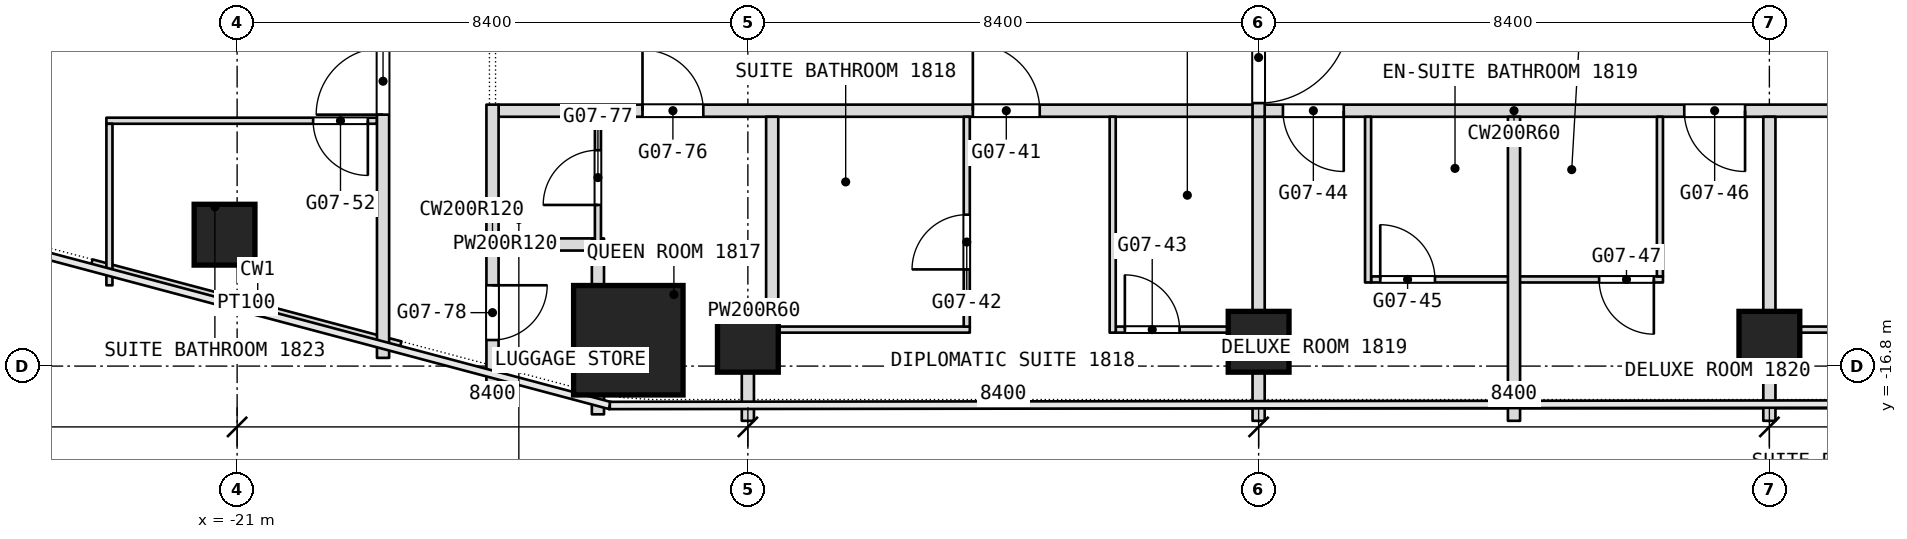
"""IFC4 building model, lengths in metres.
Left out: names, types, materials, properties, quantities, classifications, styles, units other than length and angle.
Written with IfcOpenShell. Run it as: python <this file> out.ifc"""

import sys

from ifc_helpers import new_model, si_unit, direction, frame, frame_2d, origin, origin_2d, place, context, subcontext, project, spatial, rectangle, extrude, element, fill, save


model = new_model("IFC4")
c1 = context("Model", 3, precision=1e-05, world=origin(), true_north=direction((0.0, 1.0)))
c2 = subcontext(c1, "Body", "Model", "MODEL_VIEW")
j1 = project(units=[si_unit("LENGTHUNIT", "METRE"), si_unit("PLANEANGLEUNIT", "RADIAN")], contexts=[c1])
p1 = place(None, origin())
s1 = spatial("IfcSite", under=j1, at=p1, CompositionType="ELEMENT")
p2 = place(p1, origin())
s2 = spatial("IfcBuilding", under=s1, at=p2, CompositionType="ELEMENT")
p3 = place(p2, frame((0.0, 0.0, 79.7)))
s3 = spatial("IfcBuildingStorey", under=s2, at=p3, CompositionType="ELEMENT", Elevation=79.7)
p4 = place(p3, frame((-14.566, -16.375, 0.0), z_axis=(0.0, 0.0, 1.0), x_axis=(1.0, 0.0, 0.0)))
e1 = element("IfcColumn", 1, at=p4, inside=s3, PredefinedType="COLUMN", context=c2, shape_type="SweptSolid", body=[
    extrude(rectangle(XDim=1.8, YDim=1.8, at=origin_2d()), origin(), (0.0, 0.0, 1.0), 3.6),
])
for number, where, z_axis, x_axis in (
    (2, (4.2, -16.4, 0.0), (0.0, 0.0, 1.0), (1.0, 0.0, 0.0)),
    (3, (-4.2, -16.4, 0.0), (0.0, 0.0, 1.0), (1.0, 0.0, 0.0)),
    (4, (-12.6, -16.4, 0.0), (0.0, 0.0, 1.0), (1.0, 0.0, 0.0)),
    (5, (-21.207, -14.639, 0.0), (0.0, 0.0, 1.0), (1.0, 0.0, 0.0)),
):
    element("IfcColumn", number, at=place(p3, frame(where, z_axis=z_axis, x_axis=x_axis)), inside=s3, PredefinedType="COLUMN", context=c2, shape_type="SweptSolid", body=[
        extrude(rectangle(XDim=1.0, YDim=1.0, at=origin_2d()), origin(), (0.0, 0.0, 1.0), 3.6),
    ])
p5 = place(p3, frame((-23.39, -15.094, 0.0), z_axis=(0.0, 0.0, 1.0), x_axis=(0.966552628131, -0.256468354876, 0.0)))
e6 = element("IfcWall", 6, at=p5, inside=s3, PredefinedType="PARTITIONING", context=c2, shape_type="SweptSolid", body=[
    extrude(rectangle(XDim=5.256, YDim=0.1, at=frame_2d((2.628, 0.0))), origin(), (0.0, 0.0, 1.0), 3.34),
])
p6 = place(p3, frame((-12.5, -16.2, 0.0), z_axis=(0.0, 0.0, 1.0), x_axis=(1.0, 0.0, 0.0)))
e7 = element("IfcWall", 7, at=p6, inside=s3, PredefinedType="PARTITIONING", context=c2, shape_type="SweptSolid", body=[
    extrude(rectangle(XDim=3.55, YDim=0.1, at=frame_2d((1.775, 0.0))), origin(), (0.0, 0.0, 1.0), 2.94),
])
p7 = place(p3, frame((-6.55, -16.2, 0.0), z_axis=(0.0, 0.0, 1.0), x_axis=(1.0, 0.0, 0.0)))
e8 = element("IfcWall", 8, at=p7, inside=s3, PredefinedType="PARTITIONING", context=c2, shape_type="SweptSolid", body=[
    extrude(rectangle(XDim=2.45, YDim=0.1, at=frame_2d((1.225, 0.0))), origin(), (0.0, 0.0, 1.0), 2.94),
])
p8 = place(p7, frame((0.15, 0.0, 0.0)))
e9 = element("IfcOpeningElement", 9, at=p8, cuts=e8, PredefinedType="OPENING", context=c2, shape_type="SweptSolid", body=[
    extrude(rectangle(XDim=0.9, YDim=2.1, at=frame_2d((0.45, 1.05))), frame((0.0, 0.05, 0.0), z_axis=(0.0, -1.0, 0.0), x_axis=(1.0, 0.0, 0.0)), (0.0, 0.0, 1.0), 0.1),
])
p9 = place(p3, frame((4.3, -16.2, 0.0), z_axis=(0.0, 0.0, 1.0), x_axis=(1.0, 0.0, 0.0)))
e10 = element("IfcWall", 10, at=p9, inside=s3, PredefinedType="PARTITIONING", context=c2, shape_type="SweptSolid", body=[
    extrude(rectangle(XDim=3.55, YDim=0.1, at=frame_2d((1.775, 0.0))), origin(), (0.0, 0.0, 1.0), 2.94),
])
p10 = place(p9, frame((2.5, 0.0, 0.0)))
e11 = element("IfcOpeningElement", 11, at=p10, cuts=e10, PredefinedType="OPENING", context=c2, shape_type="SweptSolid", body=[
    extrude(rectangle(XDim=0.9, YDim=2.1, at=frame_2d((0.45, 1.05))), frame((0.0, 0.05, 0.0), z_axis=(0.0, -1.0, 0.0), x_axis=(1.0, 0.0, 0.0)), (0.0, 0.0, 1.0), 0.1),
])
p11 = place(p3, frame((-12.7, -15.9, 0.0), z_axis=(0.0, 0.0, 1.0), x_axis=(1.0, 0.0, 0.0)))
e12 = element("IfcWall", 12, at=p11, inside=s3, PredefinedType="PARTITIONING", context=c2, shape_type="SweptSolid", body=[
    extrude(rectangle(XDim=0.4, YDim=0.2, at=frame_2d((0.2, 0.0))), origin(), (0.0, 0.0, 1.0), 3.34),
])
p12 = place(p3, frame((-2.35, -15.375, 0.0), z_axis=(0.0, 0.0, 1.0), x_axis=(1.0, 0.0, 0.0)))
e13 = element("IfcWall", 13, at=p12, inside=s3, PredefinedType="PARTITIONING", context=c2, shape_type="SweptSolid", body=[
    extrude(rectangle(XDim=4.8, YDim=0.1, at=frame_2d((2.4, 0.0))), origin(), (0.0, 0.0, 1.0), 3.34),
])
p13 = place(p12, frame((0.15, 0.0, 0.0)))
e14 = element("IfcOpeningElement", 14, at=p13, cuts=e13, PredefinedType="OPENING", context=c2, shape_type="SweptSolid", body=[
    extrude(rectangle(XDim=0.9, YDim=2.1, at=frame_2d((0.45, 1.05))), frame((0.0, 0.05, 0.0), z_axis=(0.0, -1.0, 0.0), x_axis=(1.0, 0.0, 0.0)), (0.0, 0.0, 1.0), 0.1),
])
p14 = place(p12, frame((3.75, 0.0, 0.0)))
e15 = element("IfcOpeningElement", 15, at=p14, cuts=e13, PredefinedType="OPENING", context=c2, shape_type="SweptSolid", body=[
    extrude(rectangle(XDim=0.9, YDim=2.1, at=frame_2d((0.45, 1.05))), frame((0.0, 0.05, 0.0), z_axis=(0.0, -1.0, 0.0), x_axis=(1.0, 0.0, 0.0)), (0.0, 0.0, 1.0), 0.1),
])
p15 = place(p3, frame((-16.7, -14.8, 0.0), z_axis=(0.0, 0.0, 1.0), x_axis=(1.0, 0.0, 0.0)))
e16 = element("IfcWall", 16, at=p15, inside=s3, PredefinedType="PARTITIONING", context=c2, shape_type="SweptSolid", body=[
    extrude(rectangle(XDim=1.584, YDim=0.2, at=frame_2d((0.792, 0.0))), origin(), (0.0, 0.0, 1.0), 3.34),
])
p16 = place(p3, frame((-23.15, -12.765, 0.0), z_axis=(0.0, 0.0, 1.0), x_axis=(1.0, 0.0, 0.0)))
e17 = element("IfcWall", 17, at=p16, inside=s3, PredefinedType="PARTITIONING", context=c2, shape_type="SweptSolid", body=[
    extrude(rectangle(XDim=4.45, YDim=0.1, at=frame_2d((2.225, 0.0))), origin(), (0.0, 0.0, 1.0), 3.34),
])
p17 = place(p16, frame((3.4, 0.0, 0.0)))
e18 = element("IfcOpeningElement", 18, at=p17, cuts=e17, PredefinedType="OPENING", context=c2, shape_type="SweptSolid", body=[
    extrude(rectangle(XDim=0.9, YDim=2.1, at=frame_2d((0.45, 1.05))), frame((0.0, 0.05, 0.0), z_axis=(0.0, -1.0, 0.0), x_axis=(1.0, 0.0, 0.0)), (0.0, 0.0, 1.0), 0.1),
])
p18 = place(p3, frame((-16.7, -12.6, 0.0), z_axis=(0.0, 0.0, 1.0), x_axis=(1.0, 0.0, 0.0)))
e19 = element("IfcWall", 19, at=p18, inside=s3, PredefinedType="PARTITIONING", context=c2, shape_type="SweptSolid", body=[
    extrude(rectangle(XDim=33.4, YDim=0.2, at=frame_2d((16.7, 0.0))), origin(), (0.0, 0.0, 1.0), 3.34),
])
p19 = place(p18, frame((7.8, 0.0, 0.0)))
e20 = element("IfcOpeningElement", 20, at=p19, cuts=e19, PredefinedType="OPENING", context=c2, shape_type="SweptSolid", body=[
    extrude(rectangle(XDim=1.1, YDim=2.1, at=frame_2d((0.55, 1.05))), frame((0.0, 0.1, 0.0), z_axis=(0.0, -1.0, 0.0), x_axis=(1.0, 0.0, 0.0)), (0.0, 0.0, 1.0), 0.2),
])
p20 = place(p18, frame((12.9, 0.0, 0.0)))
e21 = element("IfcOpeningElement", 21, at=p20, cuts=e19, PredefinedType="OPENING", context=c2, shape_type="SweptSolid", body=[
    extrude(rectangle(XDim=1.0, YDim=2.1, at=frame_2d((0.5, 1.05))), frame((0.0, 0.1, 0.0), z_axis=(0.0, -1.0, 0.0), x_axis=(1.0, 0.0, 0.0)), (0.0, 0.0, 1.0), 0.2),
])
p21 = place(p18, frame((19.5, 0.0, 0.0)))
e22 = element("IfcOpeningElement", 22, at=p21, cuts=e19, PredefinedType="OPENING", context=c2, shape_type="SweptSolid", body=[
    extrude(rectangle(XDim=1.0, YDim=2.1, at=frame_2d((0.5, 1.05))), frame((0.0, 0.1, 0.0), z_axis=(0.0, -1.0, 0.0), x_axis=(1.0, 0.0, 0.0)), (0.0, 0.0, 1.0), 0.2),
])
p22 = place(p18, frame((24.6, 0.0, 0.0)))
e23 = element("IfcOpeningElement", 23, at=p22, cuts=e19, PredefinedType="OPENING", context=c2, shape_type="SweptSolid", body=[
    extrude(rectangle(XDim=1.1, YDim=2.1, at=frame_2d((0.55, 1.05))), frame((0.0, 0.1, 0.0), z_axis=(0.0, -1.0, 0.0), x_axis=(1.0, 0.0, 0.0)), (0.0, 0.0, 1.0), 0.2),
])
p23 = place(p18, frame((2.367, 0.0, 0.0)))
e24 = element("IfcOpeningElement", 24, at=p23, cuts=e19, PredefinedType="OPENING", context=c2, shape_type="SweptSolid", body=[
    extrude(rectangle(XDim=1.0, YDim=2.1, at=frame_2d((0.5, 1.05))), frame((0.0, 0.1, 0.0), z_axis=(0.0, -1.0, 0.0), x_axis=(1.0, 0.0, 0.0)), (0.0, 0.0, 1.0), 0.2),
])
p24 = place(p18, frame((30.033, 0.0, 0.0)))
e25 = element("IfcOpeningElement", 25, at=p24, cuts=e19, PredefinedType="OPENING", context=c2, shape_type="SweptSolid", body=[
    extrude(rectangle(XDim=1.0, YDim=2.1, at=frame_2d((0.5, 1.05))), frame((0.0, 0.1, 0.0), z_axis=(0.0, -1.0, 0.0), x_axis=(1.0, 0.0, 0.0)), (0.0, 0.0, 1.0), 0.2),
])
p25 = place(p3, frame((4.2, -17.7, 0.0), z_axis=(0.0, 0.0, 1.0), x_axis=(0.0, 1.0, 0.0)))
e26 = element("IfcWall", 26, at=p25, inside=s3, PredefinedType="PARTITIONING", context=c2, shape_type="SweptSolid", body=[
    extrude(rectangle(XDim=5.0, YDim=0.2, at=frame_2d((2.5, 0.0))), origin(), (0.0, 0.0, 1.0), 3.34),
])
p26 = place(p3, frame((2.4, -15.325, 0.0), z_axis=(0.0, 0.0, 1.0), x_axis=(0.0, 1.0, 0.0)))
e27 = element("IfcWall", 27, at=p26, inside=s3, PredefinedType="PARTITIONING", context=c2, shape_type="SweptSolid", body=[
    extrude(rectangle(XDim=2.625, YDim=0.1, at=frame_2d((1.312, 0.0))), origin(), (0.0, 0.0, 1.0), 3.34),
])
p27 = place(p3, frame((0.0, -17.7, 0.0), z_axis=(0.0, 0.0, 1.0), x_axis=(0.0, 1.0, 0.0)))
e28 = element("IfcWall", 28, at=p27, inside=s3, PredefinedType="PARTITIONING", context=c2, shape_type="SweptSolid", body=[
    extrude(rectangle(XDim=5.0, YDim=0.2, at=frame_2d((2.5, 0.0))), origin(), (0.0, 0.0, 1.0), 3.34),
])
p28 = place(p3, frame((-2.4, -15.425, 0.0), z_axis=(0.0, 0.0, 1.0), x_axis=(0.0, 1.0, 0.0)))
e29 = element("IfcWall", 29, at=p28, inside=s3, PredefinedType="PARTITIONING", context=c2, shape_type="SweptSolid", body=[
    extrude(rectangle(XDim=2.725, YDim=0.1, at=frame_2d((1.363, 0.0))), origin(), (0.0, 0.0, 1.0), 3.34),
])
p29 = place(p3, frame((-4.2, -17.7, 0.0), z_axis=(0.0, 0.0, 1.0), x_axis=(0.0, 1.0, 0.0)))
e30 = element("IfcWall", 30, at=p29, inside=s3, PredefinedType="PARTITIONING", context=c2, shape_type="SweptSolid", body=[
    extrude(rectangle(XDim=5.0, YDim=0.2, at=frame_2d((2.5, 0.0))), origin(), (0.0, 0.0, 1.0), 3.34),
])
p30 = place(p3, frame((-4.2, -12.7, 0.0), z_axis=(0.0, 0.0, 1.0), x_axis=(0.0, 1.0, 0.0)))
e31 = element("IfcWall", 31, at=p30, inside=s3, PredefinedType="PARTITIONING", context=c2, shape_type="SweptSolid", body=[
    extrude(rectangle(XDim=12.7, YDim=0.2, at=frame_2d((6.35, 0.0))), origin(), (0.0, 0.0, 1.0), 3.34),
])
p31 = place(p30, frame((11.05, 0.0, 0.0)))
e32 = element("IfcOpeningElement", 32, at=p31, cuts=e31, PredefinedType="OPENING", context=c2, shape_type="SweptSolid", body=[
    extrude(rectangle(XDim=1.5, YDim=2.1, at=frame_2d((0.75, 1.05))), frame((0.0, 0.1, 0.0), z_axis=(0.0, -1.0, 0.0), x_axis=(1.0, 0.0, 0.0)), (0.0, 0.0, 1.0), 0.2),
])
p32 = place(p30, frame((0.225, 0.0, 0.0)))
e33 = element("IfcOpeningElement", 33, at=p32, cuts=e31, PredefinedType="OPENING", context=c2, shape_type="SweptSolid", body=[
    extrude(rectangle(XDim=1.5, YDim=2.1, at=frame_2d((0.75, 1.05))), frame((0.0, 0.1, 0.0), z_axis=(0.0, -1.0, 0.0), x_axis=(1.0, 0.0, 0.0)), (0.0, 0.0, 1.0), 0.2),
])
p33 = place(p3, frame((-6.6, -16.25, 0.0), z_axis=(0.0, 0.0, 1.0), x_axis=(0.0, 1.0, 0.0)))
e34 = element("IfcWall", 34, at=p33, inside=s3, PredefinedType="PARTITIONING", context=c2, shape_type="SweptSolid", body=[
    extrude(rectangle(XDim=3.55, YDim=0.1, at=frame_2d((1.775, 0.0))), origin(), (0.0, 0.0, 1.0), 3.34),
])
p34 = place(p3, frame((-9.0, -16.15, 0.0), z_axis=(0.0, 0.0, 1.0), x_axis=(0.0, 1.0, 0.0)))
e35 = element("IfcWall", 35, at=p34, inside=s3, PredefinedType="PARTITIONING", context=c2, shape_type="SweptSolid", body=[
    extrude(rectangle(XDim=3.45, YDim=0.1, at=frame_2d((1.725, 0.0))), origin(), (0.0, 0.0, 1.0), 3.34),
])
p35 = place(p34, frame((0.94, 0.0, 0.0)))
e36 = element("IfcOpeningElement", 36, at=p35, cuts=e35, PredefinedType="OPENING", context=c2, shape_type="SweptSolid", body=[
    extrude(rectangle(XDim=0.9, YDim=2.1, at=frame_2d((0.45, 1.05))), frame((0.0, 0.05, 0.0), z_axis=(0.0, -1.0, 0.0), x_axis=(1.0, 0.0, 0.0)), (0.0, 0.0, 1.0), 0.1),
])
p36 = place(p3, frame((-12.2, -16.0, 0.0), z_axis=(0.0, 0.0, 1.0), x_axis=(0.0, 1.0, 0.0)))
e37 = element("IfcWall", 37, at=p36, inside=s3, PredefinedType="PARTITIONING", context=c2, shape_type="SweptSolid", body=[
    extrude(rectangle(XDim=3.3, YDim=0.2, at=frame_2d((1.65, 0.0))), origin(), (0.0, 0.0, 1.0), 3.34),
])
p37 = place(p3, frame((-12.6, -17.7, 0.0), z_axis=(0.0, 0.0, 1.0), x_axis=(0.0, 1.0, 0.0)))
e38 = element("IfcWall", 38, at=p37, inside=s3, PredefinedType="PARTITIONING", context=c2, shape_type="SweptSolid", body=[
    extrude(rectangle(XDim=1.7, YDim=0.2, at=frame_2d((0.85, 0.0))), origin(), (0.0, 0.0, 1.0), 3.34),
])
p38 = place(p3, frame((-15.066, -17.593, 0.0), z_axis=(0.0, 0.0, 1.0), x_axis=(0.0, 1.0, 0.0)))
e39 = element("IfcWall", 39, at=p38, inside=s3, PredefinedType="PARTITIONING", context=c2, shape_type="SweptSolid", body=[
    extrude(rectangle(XDim=0.318, YDim=0.2, at=frame_2d((0.159, 0.0))), origin(), (0.0, 0.0, 1.0), 3.34),
])
p39 = place(p3, frame((-15.066, -15.475, 0.0), z_axis=(0.0, 0.0, 1.0), x_axis=(0.0, 1.0, 0.0)))
e40 = element("IfcWall", 40, at=p39, inside=s3, PredefinedType="PARTITIONING", context=c2, shape_type="SweptSolid", body=[
    extrude(rectangle(XDim=0.775, YDim=0.2, at=frame_2d((0.388, 0.0))), origin(), (0.0, 0.0, 1.0), 3.34),
])
p40 = place(p3, frame((-15.066, -14.9, 0.0), z_axis=(0.0, 0.0, 1.0), x_axis=(0.0, 1.0, 0.0)))
e41 = element("IfcWall", 41, at=p40, inside=s3, PredefinedType="PARTITIONING", context=c2, shape_type="SweptSolid", body=[
    extrude(rectangle(XDim=2.2, YDim=0.1, at=frame_2d((1.1, 0.0))), origin(), (0.0, 0.0, 1.0), 3.34),
])
p41 = place(p40, frame((0.75, 0.0, 0.0)))
e42 = element("IfcOpeningElement", 42, at=p41, cuts=e41, PredefinedType="OPENING", context=c2, shape_type="SweptSolid", body=[
    extrude(rectangle(XDim=0.9, YDim=2.1, at=frame_2d((0.45, 1.05))), frame((0.0, 0.05, 0.0), z_axis=(0.0, -1.0, 0.0), x_axis=(1.0, 0.0, 0.0)), (0.0, 0.0, 1.0), 0.1),
])
p42 = place(p3, frame((-16.8, -17.143, 0.0), z_axis=(0.0, 0.0, 1.0), x_axis=(0.0, 1.0, 0.0)))
e43 = element("IfcWall", 43, at=p42, inside=s3, PredefinedType="PARTITIONING", context=c2, shape_type="SweptSolid", body=[
    extrude(rectangle(XDim=4.643, YDim=0.2, at=frame_2d((2.322, 0.0))), origin(), (0.0, 0.0, 1.0), 3.34),
])
p43 = place(p42, frame((0.772, 0.0, 0.0)))
e44 = element("IfcOpeningElement", 44, at=p43, cuts=e43, PredefinedType="OPENING", context=c2, shape_type="SweptSolid", body=[
    extrude(rectangle(XDim=0.9, YDim=2.1, at=frame_2d((0.45, 1.05))), frame((0.0, 0.1, 0.0), z_axis=(0.0, -1.0, 0.0), x_axis=(1.0, 0.0, 0.0)), (0.0, 0.0, 1.0), 0.2),
])
p44 = place(p3, frame((-18.6, -16.665, 0.0), z_axis=(0.0, 0.0, 1.0), x_axis=(0.0, 1.0, 0.0)))
e45 = element("IfcWall", 45, at=p44, inside=s3, PredefinedType="PARTITIONING", context=c2, shape_type="SweptSolid", body=[
    extrude(rectangle(XDim=23.565, YDim=0.2, at=frame_2d((11.782, 0.0))), origin(), (0.0, 0.0, 1.0), 3.34),
])
p45 = place(p44, frame((4.0, 0.0, 0.0)))
e46 = element("IfcOpeningElement", 46, at=p45, cuts=e45, PredefinedType="OPENING", context=c2, shape_type="SweptSolid", body=[
    extrude(rectangle(XDim=1.1, YDim=2.1, at=frame_2d((0.55, 1.05))), frame((0.0, 0.1, 0.0), z_axis=(0.0, -1.0, 0.0), x_axis=(1.0, 0.0, 0.0)), (0.0, 0.0, 1.0), 0.2),
])
p46 = place(p44, frame((11.565, 0.0, 0.0)))
e47 = element("IfcOpeningElement", 47, at=p46, cuts=e45, PredefinedType="OPENING", context=c2, shape_type="SweptSolid", body=[
    extrude(rectangle(XDim=1.8, YDim=2.1, at=frame_2d((0.9, 1.05))), frame((0.0, 0.1, 0.0), z_axis=(0.0, -1.0, 0.0), x_axis=(1.0, 0.0, 0.0)), (0.0, 0.0, 1.0), 0.2),
])
p47 = place(p44, frame((19.965, 0.0, 0.0)))
e48 = element("IfcOpeningElement", 48, at=p47, cuts=e45, PredefinedType="OPENING", context=c2, shape_type="SweptSolid", body=[
    extrude(rectangle(XDim=1.8, YDim=2.1, at=frame_2d((0.9, 1.05))), frame((0.0, 0.1, 0.0), z_axis=(0.0, -1.0, 0.0), x_axis=(1.0, 0.0, 0.0)), (0.0, 0.0, 1.0), 0.2),
])
p48 = place(p3, frame((-23.1, -15.471, 0.0), z_axis=(0.0, 0.0, 1.0), x_axis=(0.0, 1.0, 0.0)))
e49 = element("IfcWall", 49, at=p48, inside=s3, PredefinedType="PARTITIONING", context=c2, shape_type="SweptSolid", body=[
    extrude(rectangle(XDim=2.656, YDim=0.1, at=frame_2d((1.328, 0.0))), origin(), (0.0, 0.0, 1.0), 3.34),
])
p49 = place(p8, origin())
e50 = element("IfcDoor", 50, at=p49, inside=s3, OperationType="SINGLE_SWING_LEFT", PredefinedType="DOOR", context=c2, shape_type="SweptSolid", body=[
    extrude(rectangle(XDim=0.9, YDim=2.1, at=frame_2d((0.45, 1.05))), frame((0.0, 0.025, 0.0), z_axis=(0.0, -1.0, 0.0), x_axis=(1.0, 0.0, 0.0)), (0.0, 0.0, 1.0), 0.05),
])
fill(e9, e50)
p50 = place(p13, origin())
e51 = element("IfcDoor", 51, at=p50, inside=s3, OperationType="SINGLE_SWING_LEFT", PredefinedType="DOOR", context=c2, shape_type="SweptSolid", body=[
    extrude(rectangle(XDim=0.9, YDim=2.1, at=frame_2d((0.45, 1.05))), frame((0.0, 0.025, 0.0), z_axis=(0.0, -1.0, 0.0), x_axis=(1.0, 0.0, 0.0)), (0.0, 0.0, 1.0), 0.05),
])
fill(e14, e51)
p51 = place(p14, origin())
e52 = element("IfcDoor", 52, at=p51, inside=s3, OperationType="SINGLE_SWING_RIGHT", PredefinedType="DOOR", context=c2, shape_type="SweptSolid", body=[
    extrude(rectangle(XDim=0.9, YDim=2.1, at=frame_2d((0.45, 1.05))), frame((0.0, 0.025, 0.0), z_axis=(0.0, -1.0, 0.0), x_axis=(1.0, 0.0, 0.0)), (0.0, 0.0, 1.0), 0.05),
])
fill(e15, e52)
p52 = place(p17, origin())
e53 = element("IfcDoor", 53, at=p52, inside=s3, OperationType="SINGLE_SWING_LEFT", PredefinedType="DOOR", context=c2, shape_type="SweptSolid", body=[
    extrude(rectangle(XDim=0.9, YDim=2.1, at=frame_2d((0.45, 1.05))), frame((0.0, 0.025, 0.0), z_axis=(0.0, -1.0, 0.0), x_axis=(1.0, 0.0, 0.0)), (0.0, 0.0, 1.0), 0.05),
])
fill(e18, e53)
p53 = place(p19, origin())
e54 = element("IfcDoor", 54, at=p53, inside=s3, OperationType="SINGLE_SWING_RIGHT", PredefinedType="DOOR", context=c2, shape_type="SweptSolid", body=[
    extrude(rectangle(XDim=1.1, YDim=2.1, at=frame_2d((0.55, 1.05))), frame((0.0, 0.025, 0.0), z_axis=(0.0, -1.0, 0.0), x_axis=(1.0, 0.0, 0.0)), (0.0, 0.0, 1.0), 0.05),
])
fill(e20, e54)
p54 = place(p20, origin())
e55 = element("IfcDoor", 55, at=p54, inside=s3, OperationType="SINGLE_SWING_RIGHT", PredefinedType="DOOR", context=c2, shape_type="SweptSolid", body=[
    extrude(rectangle(XDim=1.0, YDim=2.1, at=frame_2d((0.5, 1.05))), frame((0.0, 0.025, 0.0), z_axis=(0.0, -1.0, 0.0), x_axis=(1.0, 0.0, 0.0)), (0.0, 0.0, 1.0), 0.05),
])
fill(e21, e55)
p55 = place(p21, origin())
e56 = element("IfcDoor", 56, at=p55, inside=s3, OperationType="SINGLE_SWING_RIGHT", PredefinedType="DOOR", context=c2, shape_type="SweptSolid", body=[
    extrude(rectangle(XDim=1.0, YDim=2.1, at=frame_2d((0.5, 1.05))), frame((0.0, 0.025, 0.0), z_axis=(0.0, -1.0, 0.0), x_axis=(1.0, 0.0, 0.0)), (0.0, 0.0, 1.0), 0.05),
])
fill(e22, e56)
p56 = place(p23, origin())
e57 = element("IfcDoor", 57, at=p56, inside=s3, OperationType="SINGLE_SWING_RIGHT", PredefinedType="DOOR", context=c2, shape_type="SweptSolid", body=[
    extrude(rectangle(XDim=1.0, YDim=2.1, at=frame_2d((0.5, 1.05))), frame((0.0, 0.025, 0.0), z_axis=(0.0, -1.0, 0.0), x_axis=(1.0, 0.0, 0.0)), (0.0, 0.0, 1.0), 0.05),
])
fill(e24, e57)
p57 = place(p35, origin())
e58 = element("IfcDoor", 58, at=p57, inside=s3, OperationType="SINGLE_SWING_LEFT", PredefinedType="DOOR", context=c2, shape_type="SweptSolid", body=[
    extrude(rectangle(XDim=0.9, YDim=2.1, at=frame_2d((0.45, 1.05))), frame((0.0, 0.025, 0.0), z_axis=(0.0, -1.0, 0.0), x_axis=(1.0, 0.0, 0.0)), (0.0, 0.0, 1.0), 0.05),
])
fill(e36, e58)
p58 = place(p41, origin())
e59 = element("IfcDoor", 59, at=p58, inside=s3, OperationType="SINGLE_SWING_RIGHT", PredefinedType="DOOR", context=c2, shape_type="SweptSolid", body=[
    extrude(rectangle(XDim=0.9, YDim=2.1, at=frame_2d((0.45, 1.05))), frame((0.0, 0.025, 0.0), z_axis=(0.0, -1.0, 0.0), x_axis=(1.0, 0.0, 0.0)), (0.0, 0.0, 1.0), 0.05),
])
fill(e42, e59)
p59 = place(p43, origin())
e60 = element("IfcDoor", 60, at=p59, inside=s3, OperationType="SINGLE_SWING_LEFT", PredefinedType="DOOR", context=c2, shape_type="SweptSolid", body=[
    extrude(rectangle(XDim=0.9, YDim=2.1, at=frame_2d((0.45, 1.05))), frame((0.0, 0.025, 0.0), z_axis=(0.0, -1.0, 0.0), x_axis=(1.0, 0.0, 0.0)), (0.0, 0.0, 1.0), 0.05),
])
fill(e44, e60)
p60 = place(p45, origin())
e61 = element("IfcDoor", 61, at=p60, inside=s3, OperationType="SINGLE_SWING_LEFT", PredefinedType="DOOR", context=c2, shape_type="SweptSolid", body=[
    extrude(rectangle(XDim=1.1, YDim=2.1, at=frame_2d((0.55, 1.05))), frame((0.0, 0.025, 0.0), z_axis=(0.0, -1.0, 0.0), x_axis=(1.0, 0.0, 0.0)), (0.0, 0.0, 1.0), 0.05),
])
fill(e46, e61)
p61 = place(p32, origin())
e62 = element("IfcDoor", 62, at=p61, inside=s3, OperationType="DOUBLE_DOOR_DOUBLE_SWING", PredefinedType="DOOR", context=c2, shape_type="SweptSolid", body=[
    extrude(rectangle(XDim=1.5, YDim=2.1, at=frame_2d((0.75, 1.05))), frame((0.0, 0.025, 0.0), z_axis=(0.0, -1.0, 0.0), x_axis=(1.0, 0.0, 0.0)), (0.0, 0.0, 1.0), 0.05),
])
fill(e33, e62)
save(model, sys.argv[1])
